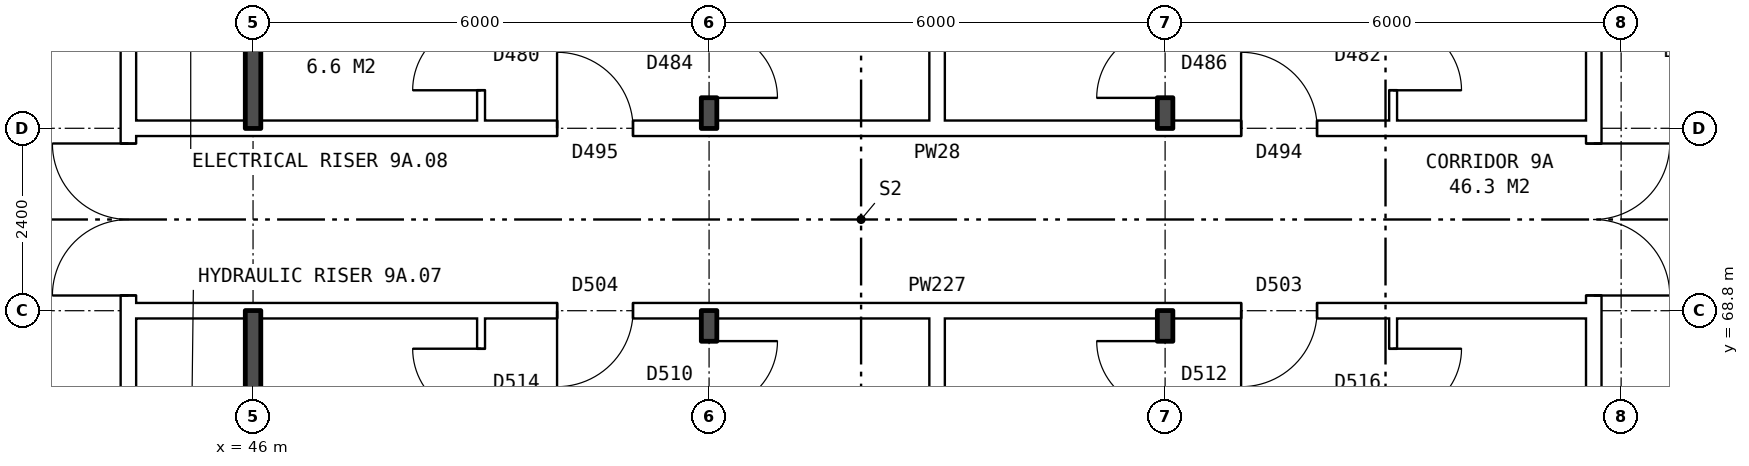
"""IFC4 building model, lengths in metres.
Left out: names, types, materials, properties, quantities, classifications, styles, units other than length and angle.
Written with IfcOpenShell. Run it as: python <this file> out.ifc"""

import sys

from ifc_helpers import new_model, si_unit, direction, frame, frame_2d, origin, place, context, subcontext, project, spatial, rectangle, extrude, element, fill, save


model = new_model("IFC4")
c1 = context("Model", 3, precision=1e-05, world=origin(), true_north=direction((0.0, 1.0)))
c2 = subcontext(c1, "Body", "Model", "MODEL_VIEW")
j1 = project(units=[si_unit("LENGTHUNIT", "METRE"), si_unit("PLANEANGLEUNIT", "RADIAN")], contexts=[c1])
p1 = place(None, origin())
s1 = spatial("IfcSite", under=j1, at=p1, CompositionType="ELEMENT")
p2 = place(p1, origin())
s2 = spatial("IfcBuilding", under=s1, at=p2, CompositionType="ELEMENT")
p3 = place(p2, frame((0.0, 0.0, 35.0)))
s3 = spatial("IfcBuildingStorey", under=s2, at=p3, CompositionType="ELEMENT", Elevation=35.0)
p4 = place(p3, frame((63.64, 63.9, 0.0), z_axis=(0.0, 0.0, 1.0), x_axis=(0.0, 1.0, 0.0)))
e1 = element("IfcWall", 1, at=p4, inside=s3, PredefinedType="PARTITIONING", context=c2, shape_type="SweptSolid", body=[
    extrude(rectangle(XDim=12.2, YDim=0.2, at=frame_2d((6.1, 0.0))), origin(), (0.0, 0.0, 1.0), 2.85),
])
p5 = place(p4, frame((5.1, 0.0, 0.0)))
e2 = element("IfcOpeningElement", 2, at=p5, cuts=e1, PredefinedType="OPENING", context=c2, shape_type="SweptSolid", body=[
    extrude(rectangle(XDim=2.0, YDim=2.1, at=frame_2d((1.0, 1.05))), frame((0.0, 0.11, 0.0), z_axis=(0.0, -1.0, 0.0), x_axis=(1.0, 0.0, 0.0)), (0.0, 0.0, 1.0), 0.22),
])
p6 = place(p3, frame((44.36, 63.9, 0.0), z_axis=(0.0, 0.0, 1.0), x_axis=(0.0, 1.0, 0.0)))
e3 = element("IfcWall", 3, at=p6, inside=s3, PredefinedType="PARTITIONING", context=c2, shape_type="SweptSolid", body=[
    extrude(rectangle(XDim=12.2, YDim=0.2, at=frame_2d((6.1, 0.0))), origin(), (0.0, 0.0, 1.0), 2.85),
])
p7 = place(p6, frame((5.1, 0.0, 0.0)))
e4 = element("IfcOpeningElement", 4, at=p7, cuts=e3, PredefinedType="OPENING", context=c2, shape_type="SweptSolid", body=[
    extrude(rectangle(XDim=2.0, YDim=2.1, at=frame_2d((1.0, 1.05))), frame((0.0, 0.11, 0.0), z_axis=(0.0, -1.0, 0.0), x_axis=(1.0, 0.0, 0.0)), (0.0, 0.0, 1.0), 0.22),
])
p8 = place(p3, frame((44.36, 68.8, 0.0), z_axis=(0.0, 0.0, 1.0), x_axis=(1.0, 0.0, 0.0)))
e5 = element("IfcWall", 5, at=p8, inside=s3, PredefinedType="PARTITIONING", context=c2, shape_type="SweptSolid", body=[
    extrude(rectangle(XDim=19.28, YDim=0.2, at=frame_2d((9.64, 0.0))), origin(), (0.0, 0.0, 1.0), 2.85),
])
p9 = place(p8, frame((14.64, 0.0, 0.0)))
e6 = element("IfcOpeningElement", 6, at=p9, cuts=e5, PredefinedType="OPENING", context=c2, shape_type="SweptSolid", body=[
    extrude(rectangle(XDim=1.0, YDim=2.1, at=frame_2d((0.5, 1.05))), frame((0.0, 0.11, 0.0), z_axis=(0.0, -1.0, 0.0), x_axis=(1.0, 0.0, 0.0)), (0.0, 0.0, 1.0), 0.22),
])
p10 = place(p8, frame((5.64, 0.0, 0.0)))
e7 = element("IfcOpeningElement", 7, at=p10, cuts=e5, PredefinedType="OPENING", context=c2, shape_type="SweptSolid", body=[
    extrude(rectangle(XDim=1.0, YDim=2.1, at=frame_2d((0.5, 1.05))), frame((0.0, 0.11, 0.0), z_axis=(0.0, -1.0, 0.0), x_axis=(1.0, 0.0, 0.0)), (0.0, 0.0, 1.0), 0.22),
])
p11 = place(p3, frame((44.36, 71.2, 0.0), z_axis=(0.0, 0.0, 1.0), x_axis=(1.0, 0.0, 0.0)))
e8 = element("IfcWall", 8, at=p11, inside=s3, PredefinedType="PARTITIONING", context=c2, shape_type="SweptSolid", body=[
    extrude(rectangle(XDim=19.28, YDim=0.2, at=frame_2d((9.64, 0.0))), origin(), (0.0, 0.0, 1.0), 2.85),
])
p12 = place(p11, frame((14.64, 0.0, 0.0)))
e9 = element("IfcOpeningElement", 9, at=p12, cuts=e8, PredefinedType="OPENING", context=c2, shape_type="SweptSolid", body=[
    extrude(rectangle(XDim=1.0, YDim=2.1, at=frame_2d((0.5, 1.05))), frame((0.0, 0.11, 0.0), z_axis=(0.0, -1.0, 0.0), x_axis=(1.0, 0.0, 0.0)), (0.0, 0.0, 1.0), 0.22),
])
p13 = place(p11, frame((5.64, 0.0, 0.0)))
e10 = element("IfcOpeningElement", 10, at=p13, cuts=e8, PredefinedType="OPENING", context=c2, shape_type="SweptSolid", body=[
    extrude(rectangle(XDim=1.0, YDim=2.1, at=frame_2d((0.5, 1.05))), frame((0.0, 0.11, 0.0), z_axis=(0.0, -1.0, 0.0), x_axis=(1.0, 0.0, 0.0)), (0.0, 0.0, 1.0), 0.22),
])
for number, where, z_axis, x_axis in (
    (11, (46.0, 63.8, 0.0), (0.0, 0.0, 1.0), (0.0, 1.0, 0.0)),
    (12, (46.0, 71.2, 0.0), (0.0, 0.0, 1.0), (0.0, 1.0, 0.0)),
):
    element("IfcWall", number, at=place(p3, frame(where, z_axis=z_axis, x_axis=x_axis)), inside=s3, PredefinedType="SOLIDWALL", context=c2, shape_type="SweptSolid", body=[
        extrude(rectangle(XDim=5.0, YDim=0.2, at=frame_2d((2.5, 0.0))), origin(), (0.0, 0.0, 1.0), 2.85),
    ])
p14 = place(p3, frame((49.0, 54.36, 0.0), z_axis=(0.0, 0.0, 1.0), x_axis=(0.0, 1.0, 0.0)))
e13 = element("IfcWall", 13, at=p14, inside=s3, PredefinedType="PARTITIONING", context=c2, shape_type="SweptSolid", body=[
    extrude(rectangle(XDim=14.34, YDim=0.1, at=frame_2d((7.17, 0.0))), origin(), (0.0, 0.0, 1.0), 2.85),
])
p15 = place(p14, frame((4.2, 0.0, 0.0)))
e14 = element("IfcOpeningElement", 14, at=p15, cuts=e13, PredefinedType="OPENING", context=c2, shape_type="SweptSolid", body=[
    extrude(rectangle(XDim=0.9, YDim=2.1, at=frame_2d((0.45, 1.05))), frame((0.0, 0.06, 0.0), z_axis=(0.0, -1.0, 0.0), x_axis=(1.0, 0.0, 0.0)), (0.0, 0.0, 1.0), 0.12),
])
p16 = place(p14, frame((13.04, 0.0, 0.0)))
e15 = element("IfcOpeningElement", 15, at=p16, cuts=e13, PredefinedType="OPENING", context=c2, shape_type="SweptSolid", body=[
    extrude(rectangle(XDim=0.9, YDim=2.1, at=frame_2d((0.45, 1.05))), frame((0.0, 0.06, 0.0), z_axis=(0.0, -1.0, 0.0), x_axis=(1.0, 0.0, 0.0)), (0.0, 0.0, 1.0), 0.12),
])
p17 = place(p3, frame((49.0, 71.3, 0.0), z_axis=(0.0, 0.0, 1.0), x_axis=(0.0, 1.0, 0.0)))
e16 = element("IfcWall", 16, at=p17, inside=s3, PredefinedType="PARTITIONING", context=c2, shape_type="SweptSolid", body=[
    extrude(rectangle(XDim=14.34, YDim=0.1, at=frame_2d((7.17, 0.0))), origin(), (0.0, 0.0, 1.0), 2.85),
])
p18 = place(p17, frame((9.24, 0.0, 0.0)))
e17 = element("IfcOpeningElement", 17, at=p18, cuts=e16, PredefinedType="OPENING", context=c2, shape_type="SweptSolid", body=[
    extrude(rectangle(XDim=0.9, YDim=2.1, at=frame_2d((0.45, 1.05))), frame((0.0, 0.06, 0.0), z_axis=(0.0, -1.0, 0.0), x_axis=(1.0, 0.0, 0.0)), (0.0, 0.0, 1.0), 0.12),
])
p19 = place(p17, frame((0.4, 0.0, 0.0)))
e18 = element("IfcOpeningElement", 18, at=p19, cuts=e16, PredefinedType="OPENING", context=c2, shape_type="SweptSolid", body=[
    extrude(rectangle(XDim=0.9, YDim=2.1, at=frame_2d((0.45, 1.05))), frame((0.0, 0.06, 0.0), z_axis=(0.0, -1.0, 0.0), x_axis=(1.0, 0.0, 0.0)), (0.0, 0.0, 1.0), 0.12),
])
p20 = place(p3, frame((52.0, 54.36, 0.0), z_axis=(0.0, 0.0, 1.0), x_axis=(0.0, 1.0, 0.0)))
e19 = element("IfcWall", 19, at=p20, inside=s3, PredefinedType="SOLIDWALL", context=c2, shape_type="SweptSolid", body=[
    extrude(rectangle(XDim=14.44, YDim=0.2, at=frame_2d((7.22, 0.0))), origin(), (0.0, 0.0, 1.0), 2.85),
])
p21 = place(p20, frame((4.2, 0.0, 0.0)))
e20 = element("IfcOpeningElement", 20, at=p21, cuts=e19, PredefinedType="OPENING", context=c2, shape_type="SweptSolid", body=[
    extrude(rectangle(XDim=0.9, YDim=2.1, at=frame_2d((0.45, 1.05))), frame((0.0, 0.11, 0.0), z_axis=(0.0, -1.0, 0.0), x_axis=(1.0, 0.0, 0.0)), (0.0, 0.0, 1.0), 0.22),
])
p22 = place(p20, frame((13.14, 0.0, 0.0)))
e21 = element("IfcOpeningElement", 21, at=p22, cuts=e19, PredefinedType="OPENING", context=c2, shape_type="SweptSolid", body=[
    extrude(rectangle(XDim=0.9, YDim=2.1, at=frame_2d((0.45, 1.05))), frame((0.0, 0.11, 0.0), z_axis=(0.0, -1.0, 0.0), x_axis=(1.0, 0.0, 0.0)), (0.0, 0.0, 1.0), 0.22),
])
p23 = place(p3, frame((52.0, 71.2, 0.0), z_axis=(0.0, 0.0, 1.0), x_axis=(0.0, 1.0, 0.0)))
e22 = element("IfcWall", 22, at=p23, inside=s3, PredefinedType="SOLIDWALL", context=c2, shape_type="SweptSolid", body=[
    extrude(rectangle(XDim=14.44, YDim=0.2, at=frame_2d((7.22, 0.0))), origin(), (0.0, 0.0, 1.0), 2.85),
])
p24 = place(p23, frame((9.34, 0.0, 0.0)))
e23 = element("IfcOpeningElement", 23, at=p24, cuts=e22, PredefinedType="OPENING", context=c2, shape_type="SweptSolid", body=[
    extrude(rectangle(XDim=0.9, YDim=2.1, at=frame_2d((0.45, 1.05))), frame((0.0, 0.11, 0.0), z_axis=(0.0, -1.0, 0.0), x_axis=(1.0, 0.0, 0.0)), (0.0, 0.0, 1.0), 0.22),
])
p25 = place(p23, frame((0.4, 0.0, 0.0)))
e24 = element("IfcOpeningElement", 24, at=p25, cuts=e22, PredefinedType="OPENING", context=c2, shape_type="SweptSolid", body=[
    extrude(rectangle(XDim=0.9, YDim=2.1, at=frame_2d((0.45, 1.05))), frame((0.0, 0.11, 0.0), z_axis=(0.0, -1.0, 0.0), x_axis=(1.0, 0.0, 0.0)), (0.0, 0.0, 1.0), 0.22),
])
for number, where, z_axis, x_axis in (
    (25, (55.0, 54.36, 0.0), (0.0, 0.0, 1.0), (0.0, 1.0, 0.0)),
    (26, (55.0, 71.3, 0.0), (0.0, 0.0, 1.0), (0.0, 1.0, 0.0)),
):
    element("IfcWall", number, at=place(p3, frame(where, z_axis=z_axis, x_axis=x_axis)), inside=s3, PredefinedType="PARTITIONING", context=c2, shape_type="SweptSolid", body=[
        extrude(rectangle(XDim=14.34, YDim=0.2, at=frame_2d((7.17, 0.0))), origin(), (0.0, 0.0, 1.0), 2.85),
    ])
p26 = place(p3, frame((58.0, 54.36, 0.0), z_axis=(0.0, 0.0, 1.0), x_axis=(0.0, 1.0, 0.0)))
e27 = element("IfcWall", 27, at=p26, inside=s3, PredefinedType="SOLIDWALL", context=c2, shape_type="SweptSolid", body=[
    extrude(rectangle(XDim=14.44, YDim=0.2, at=frame_2d((7.22, 0.0))), origin(), (0.0, 0.0, 1.0), 2.85),
])
p27 = place(p26, frame((4.2, 0.0, 0.0)))
e28 = element("IfcOpeningElement", 28, at=p27, cuts=e27, PredefinedType="OPENING", context=c2, shape_type="SweptSolid", body=[
    extrude(rectangle(XDim=0.9, YDim=2.1, at=frame_2d((0.45, 1.05))), frame((0.0, 0.11, 0.0), z_axis=(0.0, -1.0, 0.0), x_axis=(1.0, 0.0, 0.0)), (0.0, 0.0, 1.0), 0.22),
])
p28 = place(p26, frame((13.14, 0.0, 0.0)))
e29 = element("IfcOpeningElement", 29, at=p28, cuts=e27, PredefinedType="OPENING", context=c2, shape_type="SweptSolid", body=[
    extrude(rectangle(XDim=0.9, YDim=2.1, at=frame_2d((0.45, 1.05))), frame((0.0, 0.11, 0.0), z_axis=(0.0, -1.0, 0.0), x_axis=(1.0, 0.0, 0.0)), (0.0, 0.0, 1.0), 0.22),
])
p29 = place(p3, frame((58.0, 71.2, 0.0), z_axis=(0.0, 0.0, 1.0), x_axis=(0.0, 1.0, 0.0)))
e30 = element("IfcWall", 30, at=p29, inside=s3, PredefinedType="SOLIDWALL", context=c2, shape_type="SweptSolid", body=[
    extrude(rectangle(XDim=14.44, YDim=0.2, at=frame_2d((7.22, 0.0))), origin(), (0.0, 0.0, 1.0), 2.85),
])
p30 = place(p29, frame((6.84, 0.0, 0.0)))
e31 = element("IfcOpeningElement", 31, at=p30, cuts=e30, PredefinedType="OPENING", context=c2, shape_type="SweptSolid", body=[
    extrude(rectangle(XDim=0.9, YDim=2.1, at=frame_2d((0.45, 1.05))), frame((0.0, 0.11, 0.0), z_axis=(0.0, -1.0, 0.0), x_axis=(1.0, 0.0, 0.0)), (0.0, 0.0, 1.0), 0.22),
])
p31 = place(p29, frame((0.4, 0.0, 0.0)))
e32 = element("IfcOpeningElement", 32, at=p31, cuts=e30, PredefinedType="OPENING", context=c2, shape_type="SweptSolid", body=[
    extrude(rectangle(XDim=0.9, YDim=2.1, at=frame_2d((0.45, 1.05))), frame((0.0, 0.11, 0.0), z_axis=(0.0, -1.0, 0.0), x_axis=(1.0, 0.0, 0.0)), (0.0, 0.0, 1.0), 0.22),
])
p32 = place(p3, frame((61.0, 54.36, 0.0), z_axis=(0.0, 0.0, 1.0), x_axis=(0.0, 1.0, 0.0)))
e33 = element("IfcWall", 33, at=p32, inside=s3, PredefinedType="PARTITIONING", context=c2, shape_type="SweptSolid", body=[
    extrude(rectangle(XDim=14.34, YDim=0.1, at=frame_2d((7.17, 0.0))), origin(), (0.0, 0.0, 1.0), 2.85),
])
p33 = place(p32, frame((4.2, 0.0, 0.0)))
e34 = element("IfcOpeningElement", 34, at=p33, cuts=e33, PredefinedType="OPENING", context=c2, shape_type="SweptSolid", body=[
    extrude(rectangle(XDim=0.9, YDim=2.1, at=frame_2d((0.45, 1.05))), frame((0.0, 0.06, 0.0), z_axis=(0.0, -1.0, 0.0), x_axis=(1.0, 0.0, 0.0)), (0.0, 0.0, 1.0), 0.12),
])
p34 = place(p32, frame((13.04, 0.0, 0.0)))
e35 = element("IfcOpeningElement", 35, at=p34, cuts=e33, PredefinedType="OPENING", context=c2, shape_type="SweptSolid", body=[
    extrude(rectangle(XDim=0.9, YDim=2.1, at=frame_2d((0.45, 1.05))), frame((0.0, 0.06, 0.0), z_axis=(0.0, -1.0, 0.0), x_axis=(1.0, 0.0, 0.0)), (0.0, 0.0, 1.0), 0.12),
])
p35 = place(p3, frame((61.0, 71.3, 0.0), z_axis=(0.0, 0.0, 1.0), x_axis=(0.0, 1.0, 0.0)))
e36 = element("IfcWall", 36, at=p35, inside=s3, PredefinedType="PARTITIONING", context=c2, shape_type="SweptSolid", body=[
    extrude(rectangle(XDim=14.34, YDim=0.1, at=frame_2d((7.17, 0.0))), origin(), (0.0, 0.0, 1.0), 2.85),
])
p36 = place(p35, frame((6.74, 0.0, 0.0)))
e37 = element("IfcOpeningElement", 37, at=p36, cuts=e36, PredefinedType="OPENING", context=c2, shape_type="SweptSolid", body=[
    extrude(rectangle(XDim=0.9, YDim=2.1, at=frame_2d((0.45, 1.05))), frame((0.0, 0.06, 0.0), z_axis=(0.0, -1.0, 0.0), x_axis=(1.0, 0.0, 0.0)), (0.0, 0.0, 1.0), 0.12),
])
p37 = place(p35, frame((0.4, 0.0, 0.0)))
e38 = element("IfcOpeningElement", 38, at=p37, cuts=e36, PredefinedType="OPENING", context=c2, shape_type="SweptSolid", body=[
    extrude(rectangle(XDim=0.9, YDim=2.1, at=frame_2d((0.45, 1.05))), frame((0.0, 0.06, 0.0), z_axis=(0.0, -1.0, 0.0), x_axis=(1.0, 0.0, 0.0)), (0.0, 0.0, 1.0), 0.12),
])
p38 = place(p5, frame((2.0, 0.0, 0.0), z_axis=(0.0, 0.0, 1.0), x_axis=(-1.0, 0.0, 0.0)))
e39 = element("IfcDoor", 39, at=p38, inside=s3, OperationType="DOUBLE_DOOR_SINGLE_SWING", PredefinedType="DOOR", context=c2, shape_type="SweptSolid", body=[
    extrude(rectangle(XDim=2.0, YDim=2.1, at=frame_2d((1.0, 1.05))), frame((0.0, 0.025, 0.0), z_axis=(0.0, -1.0, 0.0), x_axis=(1.0, 0.0, 0.0)), (0.0, 0.0, 1.0), 0.05),
])
fill(e2, e39)
p39 = place(p7, origin())
e40 = element("IfcDoor", 40, at=p39, inside=s3, OperationType="DOUBLE_DOOR_SINGLE_SWING", PredefinedType="DOOR", context=c2, shape_type="SweptSolid", body=[
    extrude(rectangle(XDim=2.0, YDim=2.1, at=frame_2d((1.0, 1.05))), frame((0.0, 0.025, 0.0), z_axis=(0.0, -1.0, 0.0), x_axis=(1.0, 0.0, 0.0)), (0.0, 0.0, 1.0), 0.05),
])
fill(e4, e40)
p40 = place(p9, frame((1.0, 0.0, 0.0), z_axis=(0.0, 0.0, 1.0), x_axis=(-1.0, 0.0, 0.0)))
e41 = element("IfcDoor", 41, at=p40, inside=s3, OperationType="SINGLE_SWING_RIGHT", PredefinedType="DOOR", context=c2, shape_type="SweptSolid", body=[
    extrude(rectangle(XDim=1.0, YDim=2.1, at=frame_2d((0.5, 1.05))), frame((0.0, 0.025, 0.0), z_axis=(0.0, -1.0, 0.0), x_axis=(1.0, 0.0, 0.0)), (0.0, 0.0, 1.0), 0.05),
])
fill(e6, e41)
p41 = place(p34, frame((0.9, 0.0, 0.0), z_axis=(0.0, 0.0, 1.0), x_axis=(-1.0, 0.0, 0.0)))
e42 = element("IfcDoor", 42, at=p41, inside=s3, OperationType="SINGLE_SWING_LEFT", PredefinedType="DOOR", context=c2, shape_type="SweptSolid", body=[
    extrude(rectangle(XDim=0.9, YDim=2.1, at=frame_2d((0.45, 1.05))), frame((0.0, 0.025, 0.0), z_axis=(0.0, -1.0, 0.0), x_axis=(1.0, 0.0, 0.0)), (0.0, 0.0, 1.0), 0.05),
])
fill(e35, e42)
p42 = place(p28, origin())
e43 = element("IfcDoor", 43, at=p42, inside=s3, OperationType="SINGLE_SWING_RIGHT", PredefinedType="DOOR", context=c2, shape_type="SweptSolid", body=[
    extrude(rectangle(XDim=0.9, YDim=2.1, at=frame_2d((0.45, 1.05))), frame((0.0, 0.025, 0.0), z_axis=(0.0, -1.0, 0.0), x_axis=(1.0, 0.0, 0.0)), (0.0, 0.0, 1.0), 0.05),
])
fill(e29, e43)
p43 = place(p10, frame((1.0, 0.0, 0.0), z_axis=(0.0, 0.0, 1.0), x_axis=(-1.0, 0.0, 0.0)))
e44 = element("IfcDoor", 44, at=p43, inside=s3, OperationType="SINGLE_SWING_RIGHT", PredefinedType="DOOR", context=c2, shape_type="SweptSolid", body=[
    extrude(rectangle(XDim=1.0, YDim=2.1, at=frame_2d((0.5, 1.05))), frame((0.0, 0.025, 0.0), z_axis=(0.0, -1.0, 0.0), x_axis=(1.0, 0.0, 0.0)), (0.0, 0.0, 1.0), 0.05),
])
fill(e7, e44)
p44 = place(p22, frame((0.9, 0.0, 0.0), z_axis=(0.0, 0.0, 1.0), x_axis=(-1.0, 0.0, 0.0)))
e45 = element("IfcDoor", 45, at=p44, inside=s3, OperationType="SINGLE_SWING_LEFT", PredefinedType="DOOR", context=c2, shape_type="SweptSolid", body=[
    extrude(rectangle(XDim=0.9, YDim=2.1, at=frame_2d((0.45, 1.05))), frame((0.0, 0.025, 0.0), z_axis=(0.0, -1.0, 0.0), x_axis=(1.0, 0.0, 0.0)), (0.0, 0.0, 1.0), 0.05),
])
fill(e21, e45)
p45 = place(p16, origin())
e46 = element("IfcDoor", 46, at=p45, inside=s3, OperationType="SINGLE_SWING_RIGHT", PredefinedType="DOOR", context=c2, shape_type="SweptSolid", body=[
    extrude(rectangle(XDim=0.9, YDim=2.1, at=frame_2d((0.45, 1.05))), frame((0.0, 0.025, 0.0), z_axis=(0.0, -1.0, 0.0), x_axis=(1.0, 0.0, 0.0)), (0.0, 0.0, 1.0), 0.05),
])
fill(e15, e46)
p46 = place(p12, origin())
e47 = element("IfcDoor", 47, at=p46, inside=s3, OperationType="SINGLE_SWING_LEFT", PredefinedType="DOOR", context=c2, shape_type="SweptSolid", body=[
    extrude(rectangle(XDim=1.0, YDim=2.1, at=frame_2d((0.5, 1.05))), frame((0.0, 0.025, 0.0), z_axis=(0.0, -1.0, 0.0), x_axis=(1.0, 0.0, 0.0)), (0.0, 0.0, 1.0), 0.05),
])
fill(e9, e47)
p47 = place(p37, frame((0.9, 0.0, 0.0), z_axis=(0.0, 0.0, 1.0), x_axis=(-1.0, 0.0, 0.0)))
e48 = element("IfcDoor", 48, at=p47, inside=s3, OperationType="SINGLE_SWING_RIGHT", PredefinedType="DOOR", context=c2, shape_type="SweptSolid", body=[
    extrude(rectangle(XDim=0.9, YDim=2.1, at=frame_2d((0.45, 1.05))), frame((0.0, 0.025, 0.0), z_axis=(0.0, -1.0, 0.0), x_axis=(1.0, 0.0, 0.0)), (0.0, 0.0, 1.0), 0.05),
])
fill(e38, e48)
p48 = place(p31, origin())
e49 = element("IfcDoor", 49, at=p48, inside=s3, OperationType="SINGLE_SWING_LEFT", PredefinedType="DOOR", context=c2, shape_type="SweptSolid", body=[
    extrude(rectangle(XDim=0.9, YDim=2.1, at=frame_2d((0.45, 1.05))), frame((0.0, 0.025, 0.0), z_axis=(0.0, -1.0, 0.0), x_axis=(1.0, 0.0, 0.0)), (0.0, 0.0, 1.0), 0.05),
])
fill(e32, e49)
p49 = place(p13, origin())
e50 = element("IfcDoor", 50, at=p49, inside=s3, OperationType="SINGLE_SWING_LEFT", PredefinedType="DOOR", context=c2, shape_type="SweptSolid", body=[
    extrude(rectangle(XDim=1.0, YDim=2.1, at=frame_2d((0.5, 1.05))), frame((0.0, 0.025, 0.0), z_axis=(0.0, -1.0, 0.0), x_axis=(1.0, 0.0, 0.0)), (0.0, 0.0, 1.0), 0.05),
])
fill(e10, e50)
p50 = place(p25, frame((0.9, 0.0, 0.0), z_axis=(0.0, 0.0, 1.0), x_axis=(-1.0, 0.0, 0.0)))
e51 = element("IfcDoor", 51, at=p50, inside=s3, OperationType="SINGLE_SWING_RIGHT", PredefinedType="DOOR", context=c2, shape_type="SweptSolid", body=[
    extrude(rectangle(XDim=0.9, YDim=2.1, at=frame_2d((0.45, 1.05))), frame((0.0, 0.025, 0.0), z_axis=(0.0, -1.0, 0.0), x_axis=(1.0, 0.0, 0.0)), (0.0, 0.0, 1.0), 0.05),
])
fill(e24, e51)
p51 = place(p19, origin())
e52 = element("IfcDoor", 52, at=p51, inside=s3, OperationType="SINGLE_SWING_LEFT", PredefinedType="DOOR", context=c2, shape_type="SweptSolid", body=[
    extrude(rectangle(XDim=0.9, YDim=2.1, at=frame_2d((0.45, 1.05))), frame((0.0, 0.025, 0.0), z_axis=(0.0, -1.0, 0.0), x_axis=(1.0, 0.0, 0.0)), (0.0, 0.0, 1.0), 0.05),
])
fill(e18, e52)
save(model, sys.argv[1])
